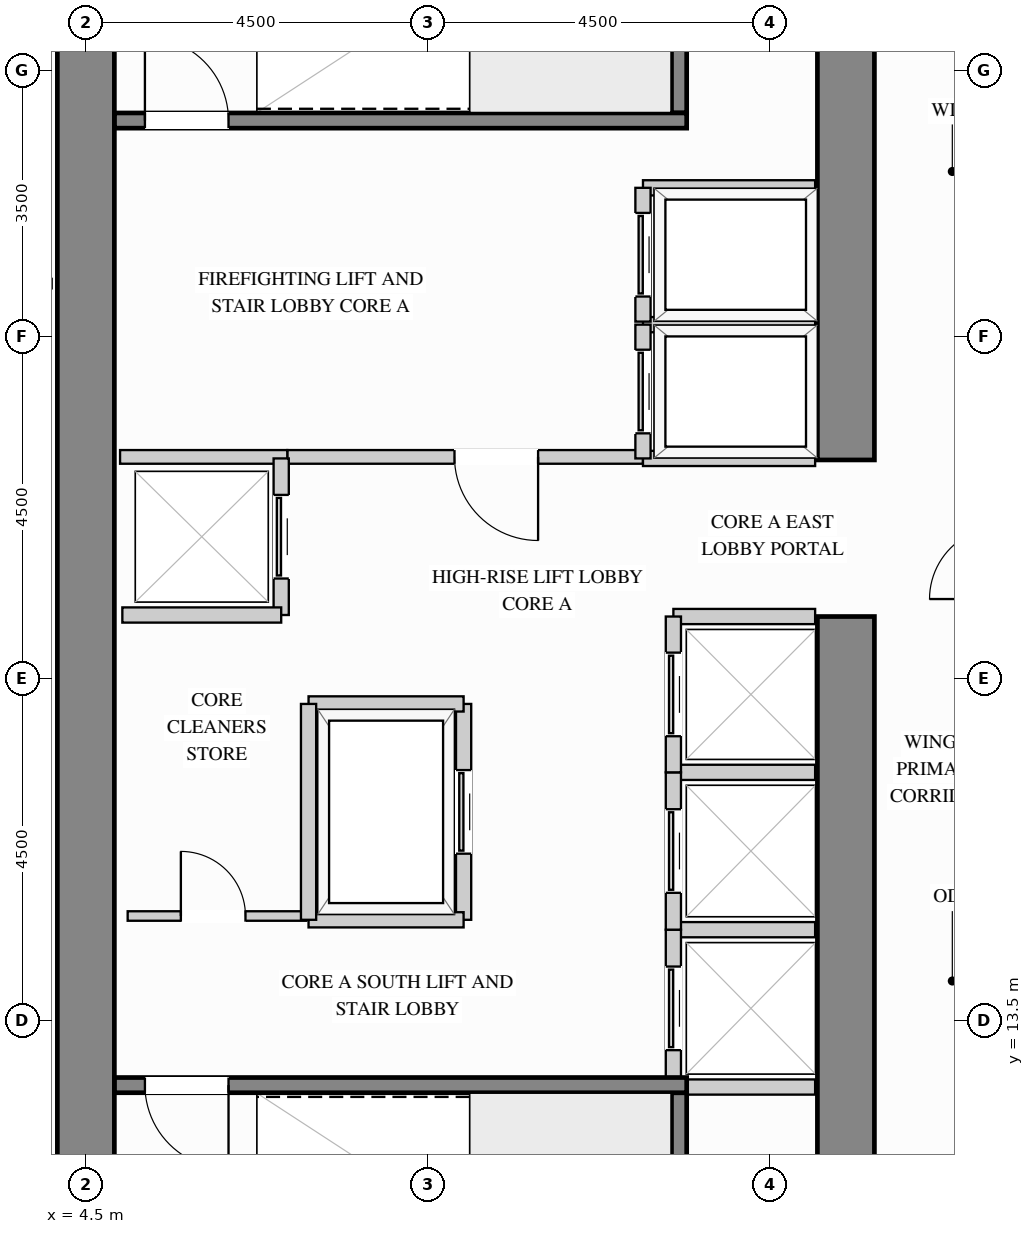
"""IFC4 building model, lengths in metres.
Left out: names, types, materials, properties, quantities, classifications, styles, units other than length and angle.
Written with IfcOpenShell. Run it as: python <this file> out.ifc"""

import sys

from ifc_helpers import new_model, si_unit, direction, frame, frame_2d, origin, place, context, subcontext, project, spatial, rectangle, extrude, source, transform, mapped, element, fill, save


model = new_model("IFC4")
c1 = context("Model", 3, precision=1e-05, world=origin(), true_north=direction((0.0, 1.0)))
c2 = subcontext(c1, "Body", "Model", "MODEL_VIEW")
j1 = project(units=[si_unit("LENGTHUNIT", "METRE"), si_unit("PLANEANGLEUNIT", "RADIAN")], contexts=[c1])
p1 = place(None, origin())
s1 = spatial("IfcSite", under=j1, at=p1, CompositionType="ELEMENT")
p2 = place(p1, origin())
s2 = spatial("IfcBuilding", under=s1, at=p2, CompositionType="ELEMENT")
p3 = place(p2, frame((0.0, 0.0, 124.2)))
s3 = spatial("IfcBuildingStorey", under=s2, at=p3, CompositionType="ELEMENT", Elevation=124.2)
m1 = source(origin(), c2, "Body", "SweptSolid", [
    extrude(rectangle(XDim=9.945, YDim=0.75, at=frame_2d((4.973, 0.0))), origin(), (0.0, 0.0, 1.0), 3.38),
])
p4 = place(p3, frame((14.5, 8.875, 0.0), z_axis=(0.0, 0.0, 1.0), x_axis=(0.0, 1.0, 0.0)))
e1 = element("IfcWall", 1, at=p4, inside=s3, PredefinedType="SHEAR", context=c2, shape_type="MappedRepresentation", body=[
    mapped(m1, transform((0.0, 0.0, 0.0), x_axis=(1.0, 0.0, 0.0), y_axis=(0.0, 1.0, 0.0), z_axis=(0.0, 0.0, 1.0))),
])
m2 = source(origin(), c2, "Body", "SweptSolid", [
    extrude(rectangle(XDim=8.245, YDim=0.75, at=frame_2d((4.123, 0.0))), origin(), (0.0, 0.0, 1.0), 3.38),
])
p5 = place(p3, frame((14.5, 20.88, 0.0), z_axis=(0.0, 0.0, 1.0), x_axis=(0.0, 1.0, 0.0)))
e2 = element("IfcWall", 2, at=p5, inside=s3, PredefinedType="SHEAR", context=c2, shape_type="MappedRepresentation", body=[
    mapped(m2, transform((0.0, 0.0, 0.0), x_axis=(1.0, 0.0, 0.0), y_axis=(0.0, 1.0, 0.0), z_axis=(0.0, 0.0, 1.0))),
])
m3 = source(origin(), c2, "Body", "SweptSolid", [
    extrude(rectangle(XDim=20.25, YDim=0.75, at=frame_2d((10.125, 0.0))), origin(), (0.0, 0.0, 1.0), 3.38),
])
p6 = place(p3, frame((4.5, 8.875, 0.0), z_axis=(0.0, 0.0, 1.0), x_axis=(0.0, 1.0, 0.0)))
e3 = element("IfcWall", 3, at=p6, inside=s3, PredefinedType="SHEAR", context=c2, shape_type="MappedRepresentation", body=[
    mapped(m3, transform((0.0, 0.0, 0.0), x_axis=(1.0, 0.0, 0.0), y_axis=(0.0, 1.0, 0.0), z_axis=(0.0, 0.0, 1.0))),
])
p7 = place(p3, frame((7.15, 20.92, 0.0), z_axis=(0.0, 0.0, 1.0), x_axis=(1.0, 0.0, 0.0)))
e4 = element("IfcWall", 4, at=p7, inside=s3, PredefinedType="PARTITIONING", context=c2, shape_type="SweptSolid", body=[
    extrude(rectangle(XDim=4.68, YDim=0.18, at=frame_2d((2.34, 0.0))), origin(), (0.0, 0.0, 1.0), 3.365),
])
p8 = place(p7, frame((2.2, 0.0, 0.0)))
e5 = element("IfcOpeningElement", 5, at=p8, cuts=e4, PredefinedType="OPENING", context=c2, shape_type="SweptSolid", body=[
    extrude(rectangle(XDim=1.1, YDim=2.15, at=frame_2d((0.55, 1.075))), frame((0.0, 0.1, 0.0), z_axis=(0.0, -1.0, 0.0), x_axis=(1.0, 0.0, 0.0)), (0.0, 0.0, 1.0), 0.2),
])
m4 = source(origin(), c2, "Body", "SweptSolid", [
    extrude(rectangle(XDim=2.2, YDim=0.18, at=frame_2d((1.1, 0.0))), origin(), (0.0, 0.0, 1.0), 3.365),
])
p9 = place(p3, frame((4.95, 20.92, 0.0), z_axis=(0.0, 0.0, 1.0), x_axis=(1.0, 0.0, 0.0)))
e6 = element("IfcWall", 6, at=p9, inside=s3, PredefinedType="PARTITIONING", context=c2, shape_type="MappedRepresentation", body=[
    mapped(m4, transform((0.0, 0.0, 0.0), x_axis=(1.0, 0.0, 0.0), y_axis=(0.0, 1.0, 0.0), z_axis=(0.0, 0.0, 1.0))),
])
p10 = place(p3, frame((5.05, 14.88, 0.0), z_axis=(0.0, 0.0, 1.0), x_axis=(1.0, 0.0, 0.0)))
e7 = element("IfcWall", 7, at=p10, inside=s3, PredefinedType="PARTITIONING", context=c2, shape_type="SweptSolid", body=[
    extrude(rectangle(XDim=2.35, YDim=0.125, at=frame_2d((1.175, 0.0))), origin(), (0.0, 0.0, 1.0), 3.365),
])
p11 = place(p10, frame((0.7, 0.0, 0.0)))
e8 = element("IfcOpeningElement", 8, at=p11, cuts=e7, PredefinedType="OPENING", context=c2, shape_type="SweptSolid", body=[
    extrude(rectangle(XDim=0.85, YDim=2.1, at=frame_2d((0.425, 1.05))), frame((0.0, 0.073, 0.0), z_axis=(0.0, -1.0, 0.0), x_axis=(1.0, 0.0, 0.0)), (0.0, 0.0, 1.0), 0.145),
])
m5 = source(origin(), c2, "Body", "SweptSolid", [
    extrude(rectangle(XDim=3.698, YDim=0.125, at=frame_2d((1.849, 0.0))), origin(), (0.0, 0.0, 1.0), 3.365),
])
p12 = place(p3, frame((0.352, 23.2, 0.0), z_axis=(0.0, 0.0, 1.0), x_axis=(1.0, 0.0, 0.0)))
e9 = element("IfcWall", 9, at=p12, inside=s3, PredefinedType="PARTITIONING", context=c2, shape_type="MappedRepresentation", body=[
    mapped(m5, transform((0.0, 0.0, 0.0), x_axis=(1.0, 0.0, 0.0), y_axis=(0.0, 1.0, 0.0), z_axis=(0.0, 0.0, 1.0))),
])
m6 = source(origin(), c2, "Body", "SweptSolid", [
    extrude(rectangle(XDim=2.265, YDim=0.2, at=frame_2d((1.132, 0.0))), origin(), (0.0, 0.0, 1.0), 3.365),
])
for number, where, z_axis, x_axis in (
    (10, (11.83, 22.66, 0.0), (0.0, 0.0, 1.0), (1.0, 0.0, 0.0)),
    (11, (11.83, 20.9, 0.0), (0.0, 0.0, 1.0), (1.0, 0.0, 0.0)),
):
    element("IfcWall", number, at=place(p3, frame(where, z_axis=z_axis, x_axis=x_axis)), inside=s3, PredefinedType="PARTITIONING", context=c2, shape_type="MappedRepresentation", body=[
        mapped(m6, transform((0.0, 0.0, 0.0), x_axis=(1.0, 0.0, 0.0), y_axis=(0.0, 1.0, 0.0), z_axis=(0.0, 0.0, 1.0))),
    ])
p13 = place(p3, frame((11.83, 20.9, 0.0), z_axis=(0.0, 0.0, 1.0), x_axis=(0.0, 1.0, 0.0)))
e12 = element("IfcWall", 12, at=p13, inside=s3, PredefinedType="PARTITIONING", context=c2, shape_type="SweptSolid", body=[
    extrude(rectangle(XDim=1.76, YDim=0.2, at=frame_2d((0.88, 0.0))), origin(), (0.0, 0.0, 1.0), 3.365),
])
p14 = place(p13, frame((0.33, 0.0, 0.0)))
e13 = element("IfcOpeningElement", 13, at=p14, cuts=e12, PredefinedType="OPENING", context=c2, shape_type="SweptSolid", body=[
    extrude(rectangle(XDim=1.1, YDim=2.2, at=frame_2d((0.55, 1.1))), frame((0.0, 0.11, 0.0), z_axis=(0.0, -1.0, 0.0), x_axis=(1.0, 0.0, 0.0)), (0.0, 0.0, 1.0), 0.22),
])
p15 = place(p3, frame((11.83, 24.46, 0.0), z_axis=(0.0, 0.0, 1.0), x_axis=(1.0, 0.0, 0.0)))
e14 = element("IfcWall", 14, at=p15, inside=s3, PredefinedType="PARTITIONING", context=c2, shape_type="MappedRepresentation", body=[
    mapped(m6, transform((0.0, 0.0, 0.0), x_axis=(1.0, 0.0, 0.0), y_axis=(0.0, 1.0, 0.0), z_axis=(0.0, 0.0, 1.0))),
])
p16 = place(p3, frame((11.83, 22.7, 0.0), z_axis=(0.0, 0.0, 1.0), x_axis=(0.0, 1.0, 0.0)))
e15 = element("IfcWall", 15, at=p16, inside=s3, PredefinedType="PARTITIONING", context=c2, shape_type="SweptSolid", body=[
    extrude(rectangle(XDim=1.76, YDim=0.2, at=frame_2d((0.88, 0.0))), origin(), (0.0, 0.0, 1.0), 3.365),
])
p17 = place(p16, frame((0.33, 0.0, 0.0)))
e16 = element("IfcOpeningElement", 16, at=p17, cuts=e15, PredefinedType="OPENING", context=c2, shape_type="SweptSolid", body=[
    extrude(rectangle(XDim=1.1, YDim=2.2, at=frame_2d((0.55, 1.1))), frame((0.0, 0.11, 0.0), z_axis=(0.0, -1.0, 0.0), x_axis=(1.0, 0.0, 0.0)), (0.0, 0.0, 1.0), 0.22),
])
m7 = source(origin(), c2, "Body", "SweptSolid", [
    extrude(rectangle(XDim=1.865, YDim=0.2, at=frame_2d((0.933, 0.0))), origin(), (0.0, 0.0, 1.0), 3.365),
])
for number, where, z_axis, x_axis in (
    (17, (12.23, 14.7, 0.0), (0.0, 0.0, 1.0), (1.0, 0.0, 0.0)),
    (18, (12.23, 12.63, 0.0), (0.0, 0.0, 1.0), (1.0, 0.0, 0.0)),
):
    element("IfcWall", number, at=place(p3, frame(where, z_axis=z_axis, x_axis=x_axis)), inside=s3, PredefinedType="PARTITIONING", context=c2, shape_type="MappedRepresentation", body=[
        mapped(m7, transform((0.0, 0.0, 0.0), x_axis=(1.0, 0.0, 0.0), y_axis=(0.0, 1.0, 0.0), z_axis=(0.0, 0.0, 1.0))),
    ])
p18 = place(p3, frame((12.23, 12.63, 0.0), z_axis=(0.0, 0.0, 1.0), x_axis=(0.0, 1.0, 0.0)))
e19 = element("IfcWall", 19, at=p18, inside=s3, PredefinedType="PARTITIONING", context=c2, shape_type="SweptSolid", body=[
    extrude(rectangle(XDim=2.07, YDim=0.2, at=frame_2d((1.035, 0.0))), origin(), (0.0, 0.0, 1.0), 3.365),
])
p19 = place(p18, frame((0.485, 0.0, 0.0)))
e20 = element("IfcOpeningElement", 20, at=p19, cuts=e19, PredefinedType="OPENING", context=c2, shape_type="SweptSolid", body=[
    extrude(rectangle(XDim=1.1, YDim=2.2, at=frame_2d((0.55, 1.1))), frame((0.0, 0.11, 0.0), z_axis=(0.0, -1.0, 0.0), x_axis=(1.0, 0.0, 0.0)), (0.0, 0.0, 1.0), 0.22),
])
p20 = place(p3, frame((12.23, 16.77, 0.0), z_axis=(0.0, 0.0, 1.0), x_axis=(1.0, 0.0, 0.0)))
e21 = element("IfcWall", 21, at=p20, inside=s3, PredefinedType="PARTITIONING", context=c2, shape_type="MappedRepresentation", body=[
    mapped(m7, transform((0.0, 0.0, 0.0), x_axis=(1.0, 0.0, 0.0), y_axis=(0.0, 1.0, 0.0), z_axis=(0.0, 0.0, 1.0))),
])
p21 = place(p3, frame((12.23, 14.7, 0.0), z_axis=(0.0, 0.0, 1.0), x_axis=(0.0, 1.0, 0.0)))
e22 = element("IfcWall", 22, at=p21, inside=s3, PredefinedType="PARTITIONING", context=c2, shape_type="SweptSolid", body=[
    extrude(rectangle(XDim=2.07, YDim=0.2, at=frame_2d((1.035, 0.0))), origin(), (0.0, 0.0, 1.0), 3.365),
])
p22 = place(p21, frame((0.485, 0.0, 0.0)))
e23 = element("IfcOpeningElement", 23, at=p22, cuts=e22, PredefinedType="OPENING", context=c2, shape_type="SweptSolid", body=[
    extrude(rectangle(XDim=1.1, YDim=2.2, at=frame_2d((0.55, 1.1))), frame((0.0, 0.11, 0.0), z_axis=(0.0, -1.0, 0.0), x_axis=(1.0, 0.0, 0.0)), (0.0, 0.0, 1.0), 0.22),
])
p23 = place(p3, frame((12.23, 18.82, 0.0), z_axis=(0.0, 0.0, 1.0), x_axis=(1.0, 0.0, 0.0)))
e24 = element("IfcWall", 24, at=p23, inside=s3, PredefinedType="PARTITIONING", context=c2, shape_type="MappedRepresentation", body=[
    mapped(m7, transform((0.0, 0.0, 0.0), x_axis=(1.0, 0.0, 0.0), y_axis=(0.0, 1.0, 0.0), z_axis=(0.0, 0.0, 1.0))),
])
p24 = place(p3, frame((12.23, 16.77, 0.0), z_axis=(0.0, 0.0, 1.0), x_axis=(0.0, 1.0, 0.0)))
e25 = element("IfcWall", 25, at=p24, inside=s3, PredefinedType="PARTITIONING", context=c2, shape_type="SweptSolid", body=[
    extrude(rectangle(XDim=2.05, YDim=0.2, at=frame_2d((1.025, 0.0))), origin(), (0.0, 0.0, 1.0), 3.365),
])
p25 = place(p24, frame((0.475, 0.0, 0.0)))
e26 = element("IfcOpeningElement", 26, at=p25, cuts=e25, PredefinedType="OPENING", context=c2, shape_type="SweptSolid", body=[
    extrude(rectangle(XDim=1.1, YDim=2.2, at=frame_2d((0.55, 1.1))), frame((0.0, 0.11, 0.0), z_axis=(0.0, -1.0, 0.0), x_axis=(1.0, 0.0, 0.0)), (0.0, 0.0, 1.0), 0.22),
])
p26 = place(p3, frame((7.07, 18.84, 0.0), z_axis=(0.0, 0.0, 1.0), x_axis=(0.0, 1.0, 0.0)))
e27 = element("IfcWall", 27, at=p26, inside=s3, PredefinedType="PARTITIONING", context=c2, shape_type="SweptSolid", body=[
    extrude(rectangle(XDim=2.06, YDim=0.2, at=frame_2d((1.03, 0.0))), origin(), (0.0, 0.0, 1.0), 3.365),
])
p27 = place(p26, frame((0.48, 0.0, 0.0)))
e28 = element("IfcOpeningElement", 28, at=p27, cuts=e27, PredefinedType="OPENING", context=c2, shape_type="SweptSolid", body=[
    extrude(rectangle(XDim=1.1, YDim=2.2, at=frame_2d((0.55, 1.1))), frame((0.0, 0.11, 0.0), z_axis=(0.0, -1.0, 0.0), x_axis=(1.0, 0.0, 0.0)), (0.0, 0.0, 1.0), 0.22),
])
m8 = source(origin(), c2, "Body", "SweptSolid", [
    extrude(rectangle(XDim=2.09, YDim=0.2, at=frame_2d((1.045, 0.0))), origin(), (0.0, 0.0, 1.0), 3.365),
])
p28 = place(p3, frame((4.98, 18.84, 0.0), z_axis=(0.0, 0.0, 1.0), x_axis=(1.0, 0.0, 0.0)))
e29 = element("IfcWall", 29, at=p28, inside=s3, PredefinedType="PARTITIONING", context=c2, shape_type="MappedRepresentation", body=[
    mapped(m8, transform((0.0, 0.0, 0.0), x_axis=(1.0, 0.0, 0.0), y_axis=(0.0, 1.0, 0.0), z_axis=(0.0, 0.0, 1.0))),
])
p29 = place(p3, frame((9.47, 14.83, 0.0), z_axis=(0.0, 0.0, 1.0), x_axis=(0.0, 1.0, 0.0)))
e30 = element("IfcWall", 30, at=p29, inside=s3, PredefinedType="PARTITIONING", context=c2, shape_type="SweptSolid", body=[
    extrude(rectangle(XDim=2.84, YDim=0.2, at=frame_2d((1.42, 0.0))), origin(), (0.0, 0.0, 1.0), 3.365),
])
p30 = place(p29, frame((0.87, 0.0, 0.0)))
e31 = element("IfcOpeningElement", 31, at=p30, cuts=e30, PredefinedType="OPENING", context=c2, shape_type="SweptSolid", body=[
    extrude(rectangle(XDim=1.1, YDim=2.2, at=frame_2d((0.55, 1.1))), frame((0.0, 0.11, 0.0), z_axis=(0.0, -1.0, 0.0), x_axis=(1.0, 0.0, 0.0)), (0.0, 0.0, 1.0), 0.22),
])
m9 = source(origin(), c2, "Body", "SweptSolid", [
    extrude(rectangle(XDim=2.04, YDim=0.2, at=frame_2d((1.02, 0.0))), origin(), (0.0, 0.0, 1.0), 3.365),
])
for number, where, z_axis, x_axis in (
    (32, (7.43, 17.67, 0.0), (0.0, 0.0, 1.0), (1.0, 0.0, 0.0)),
    (33, (7.43, 14.83, 0.0), (0.0, 0.0, 1.0), (1.0, 0.0, 0.0)),
):
    element("IfcWall", number, at=place(p3, frame(where, z_axis=z_axis, x_axis=x_axis)), inside=s3, PredefinedType="PARTITIONING", context=c2, shape_type="MappedRepresentation", body=[
        mapped(m9, transform((0.0, 0.0, 0.0), x_axis=(1.0, 0.0, 0.0), y_axis=(0.0, 1.0, 0.0), z_axis=(0.0, 0.0, 1.0))),
    ])
m10 = source(origin(), c2, "Body", "SweptSolid", [
    extrude(rectangle(XDim=2.84, YDim=0.2, at=frame_2d((1.42, 0.0))), origin(), (0.0, 0.0, 1.0), 3.365),
])
p31 = place(p3, frame((7.43, 14.83, 0.0), z_axis=(0.0, 0.0, 1.0), x_axis=(0.0, 1.0, 0.0)))
e34 = element("IfcWall", 34, at=p31, inside=s3, PredefinedType="PARTITIONING", context=c2, shape_type="MappedRepresentation", body=[
    mapped(m10, transform((0.0, 0.0, 0.0), x_axis=(1.0, 0.0, 0.0), y_axis=(0.0, 1.0, 0.0), z_axis=(0.0, 0.0, 1.0))),
])
m11 = source(origin(), c2, "Body", "SweptSolid", [
    extrude(rectangle(XDim=3.678, YDim=0.2, at=frame_2d((1.839, 0.0))), origin(), (0.0, 0.0, 1.0), 3.38),
])
p32 = place(p3, frame((12.305, 8.877, 0.0), z_axis=(0.0, 0.0, 1.0), x_axis=(0.0, 1.0, 0.0)))
e35 = element("IfcWall", 35, at=p32, inside=s3, PredefinedType="SHEAR", context=c2, shape_type="MappedRepresentation", body=[
    mapped(m11, transform((0.0, 0.0, 0.0), x_axis=(1.0, 0.0, 0.0), y_axis=(0.0, 1.0, 0.0), z_axis=(0.0, 0.0, 1.0))),
])
p33 = place(p3, frame((4.877, 12.655, 0.0), z_axis=(0.0, 0.0, 1.0), x_axis=(1.0, 0.0, 0.0)))
e36 = element("IfcWall", 36, at=p33, inside=s3, PredefinedType="SHEAR", context=c2, shape_type="SweptSolid", body=[
    extrude(rectangle(XDim=7.528, YDim=0.2, at=frame_2d((3.764, 0.0))), origin(), (0.0, 0.0, 1.0), 3.38),
])
p34 = place(p33, frame((0.4, 0.0, 0.0)))
e37 = element("IfcOpeningElement", 37, at=p34, cuts=e36, PredefinedType="OPENING", context=c2, shape_type="SweptSolid", body=[
    extrude(rectangle(XDim=1.1, YDim=2.15, at=frame_2d((0.55, 1.075))), frame((0.0, 0.11, 0.0), z_axis=(0.0, -1.0, 0.0), x_axis=(1.0, 0.0, 0.0)), (0.0, 0.0, 1.0), 0.22),
])
p35 = place(p3, frame((12.305, 25.445, 0.0), z_axis=(0.0, 0.0, 1.0), x_axis=(0.0, 1.0, 0.0)))
e38 = element("IfcWall", 38, at=p35, inside=s3, PredefinedType="SHEAR", context=c2, shape_type="MappedRepresentation", body=[
    mapped(m11, transform((0.0, 0.0, 0.0), x_axis=(1.0, 0.0, 0.0), y_axis=(0.0, 1.0, 0.0), z_axis=(0.0, 0.0, 1.0))),
])
p36 = place(p3, frame((4.877, 25.345, 0.0), z_axis=(0.0, 0.0, 1.0), x_axis=(1.0, 0.0, 0.0)))
e39 = element("IfcWall", 39, at=p36, inside=s3, PredefinedType="SHEAR", context=c2, shape_type="SweptSolid", body=[
    extrude(rectangle(XDim=7.528, YDim=0.2, at=frame_2d((3.764, 0.0))), origin(), (0.0, 0.0, 1.0), 3.38),
])
p37 = place(p36, frame((0.4, 0.0, 0.0)))
e40 = element("IfcOpeningElement", 40, at=p37, cuts=e39, PredefinedType="OPENING", context=c2, shape_type="SweptSolid", body=[
    extrude(rectangle(XDim=1.1, YDim=2.15, at=frame_2d((0.55, 1.075))), frame((0.0, 0.11, 0.0), z_axis=(0.0, -1.0, 0.0), x_axis=(1.0, 0.0, 0.0)), (0.0, 0.0, 1.0), 0.22),
])
m12 = source(origin(), c2, "Body", "SweptSolid", [
    extrude(rectangle(XDim=1.1, YDim=2.15, at=frame_2d((0.55, 1.075))), frame((0.0, 0.025, 0.0), z_axis=(0.0, -1.0, 0.0), x_axis=(1.0, 0.0, 0.0)), (0.0, 0.0, 1.0), 0.05),
])
p38 = place(p8, origin())
e41 = element("IfcDoor", 41, at=p38, inside=s3, OperationType="SINGLE_SWING_RIGHT", PredefinedType="DOOR", context=c2, shape_type="MappedRepresentation", body=[
    mapped(m12, transform((0.0, 0.0, 0.0), x_axis=(1.0, 0.0, 0.0), y_axis=(0.0, 1.0, 0.0), z_axis=(0.0, 0.0, 1.0))),
])
fill(e5, e41)
m13 = source(origin(), c2, "Body", "SweptSolid", [
    extrude(rectangle(XDim=1.1, YDim=2.2, at=frame_2d((0.55, 1.1))), frame((0.0, 0.025, 0.0), z_axis=(0.0, -1.0, 0.0), x_axis=(1.0, 0.0, 0.0)), (0.0, 0.0, 1.0), 0.05),
])
p39 = place(p14, origin())
e42 = element("IfcDoor", 42, at=p39, inside=s3, OperationType="SLIDING_TO_LEFT", PredefinedType="DOOR", context=c2, shape_type="MappedRepresentation", body=[
    mapped(m13, transform((0.0, 0.0, 0.0), x_axis=(1.0, 0.0, 0.0), y_axis=(0.0, 1.0, 0.0), z_axis=(0.0, 0.0, 1.0))),
])
fill(e13, e42)
p40 = place(p17, origin())
e43 = element("IfcDoor", 43, at=p40, inside=s3, OperationType="SLIDING_TO_LEFT", PredefinedType="DOOR", context=c2, shape_type="MappedRepresentation", body=[
    mapped(m13, transform((0.0, 0.0, 0.0), x_axis=(1.0, 0.0, 0.0), y_axis=(0.0, 1.0, 0.0), z_axis=(0.0, 0.0, 1.0))),
])
fill(e16, e43)
p41 = place(p19, origin())
e44 = element("IfcDoor", 44, at=p41, inside=s3, OperationType="SLIDING_TO_LEFT", PredefinedType="DOOR", context=c2, shape_type="MappedRepresentation", body=[
    mapped(m13, transform((0.0, 0.0, 0.0), x_axis=(1.0, 0.0, 0.0), y_axis=(0.0, 1.0, 0.0), z_axis=(0.0, 0.0, 1.0))),
])
fill(e20, e44)
p42 = place(p22, origin())
e45 = element("IfcDoor", 45, at=p42, inside=s3, OperationType="SLIDING_TO_LEFT", PredefinedType="DOOR", context=c2, shape_type="MappedRepresentation", body=[
    mapped(m13, transform((0.0, 0.0, 0.0), x_axis=(1.0, 0.0, 0.0), y_axis=(0.0, 1.0, 0.0), z_axis=(0.0, 0.0, 1.0))),
])
fill(e23, e45)
p43 = place(p25, origin())
e46 = element("IfcDoor", 46, at=p43, inside=s3, OperationType="SLIDING_TO_LEFT", PredefinedType="DOOR", context=c2, shape_type="MappedRepresentation", body=[
    mapped(m13, transform((0.0, 0.0, 0.0), x_axis=(1.0, 0.0, 0.0), y_axis=(0.0, 1.0, 0.0), z_axis=(0.0, 0.0, 1.0))),
])
fill(e26, e46)
p44 = place(p27, origin())
e47 = element("IfcDoor", 47, at=p44, inside=s3, OperationType="SLIDING_TO_LEFT", PredefinedType="DOOR", context=c2, shape_type="MappedRepresentation", body=[
    mapped(m13, transform((0.0, 0.0, 0.0), x_axis=(1.0, 0.0, 0.0), y_axis=(0.0, 1.0, 0.0), z_axis=(0.0, 0.0, 1.0))),
])
fill(e28, e47)
p45 = place(p30, origin())
e48 = element("IfcDoor", 48, at=p45, inside=s3, OperationType="SLIDING_TO_LEFT", PredefinedType="DOOR", context=c2, shape_type="MappedRepresentation", body=[
    mapped(m13, transform((0.0, 0.0, 0.0), x_axis=(1.0, 0.0, 0.0), y_axis=(0.0, 1.0, 0.0), z_axis=(0.0, 0.0, 1.0))),
])
fill(e31, e48)
m14 = source(origin(), c2, "Body", "SweptSolid", [
    extrude(rectangle(XDim=0.85, YDim=2.1, at=frame_2d((0.425, 1.05))), frame((0.0, 0.025, 0.0), z_axis=(0.0, -1.0, 0.0), x_axis=(1.0, 0.0, 0.0)), (0.0, 0.0, 1.0), 0.05),
])
p46 = place(p11, origin())
e49 = element("IfcDoor", 49, at=p46, inside=s3, OperationType="SINGLE_SWING_LEFT", PredefinedType="DOOR", context=c2, shape_type="MappedRepresentation", body=[
    mapped(m14, transform((0.0, 0.0, 0.0), x_axis=(1.0, 0.0, 0.0), y_axis=(0.0, 1.0, 0.0), z_axis=(0.0, 0.0, 1.0))),
])
fill(e8, e49)
m15 = source(origin(), c2, "Body", "SweptSolid", [
    extrude(rectangle(XDim=1.1, YDim=2.15, at=frame_2d((0.55, 1.075))), frame((0.0, 0.025, 0.0), z_axis=(0.0, -1.0, 0.0), x_axis=(1.0, 0.0, 0.0)), (0.0, 0.0, 1.0), 0.05),
])
p47 = place(p34, origin())
e50 = element("IfcDoor", 50, at=p47, inside=s3, OperationType="SINGLE_SWING_RIGHT", PredefinedType="DOOR", context=c2, shape_type="MappedRepresentation", body=[
    mapped(m15, transform((0.0, 0.0, 0.0), x_axis=(1.0, 0.0, 0.0), y_axis=(0.0, 1.0, 0.0), z_axis=(0.0, 0.0, 1.0))),
])
fill(e37, e50)
p48 = place(p37, origin())
e51 = element("IfcDoor", 51, at=p48, inside=s3, OperationType="SINGLE_SWING_LEFT", PredefinedType="DOOR", context=c2, shape_type="MappedRepresentation", body=[
    mapped(m15, transform((0.0, 0.0, 0.0), x_axis=(1.0, 0.0, 0.0), y_axis=(0.0, 1.0, 0.0), z_axis=(0.0, 0.0, 1.0))),
])
fill(e40, e51)
save(model, sys.argv[1])
